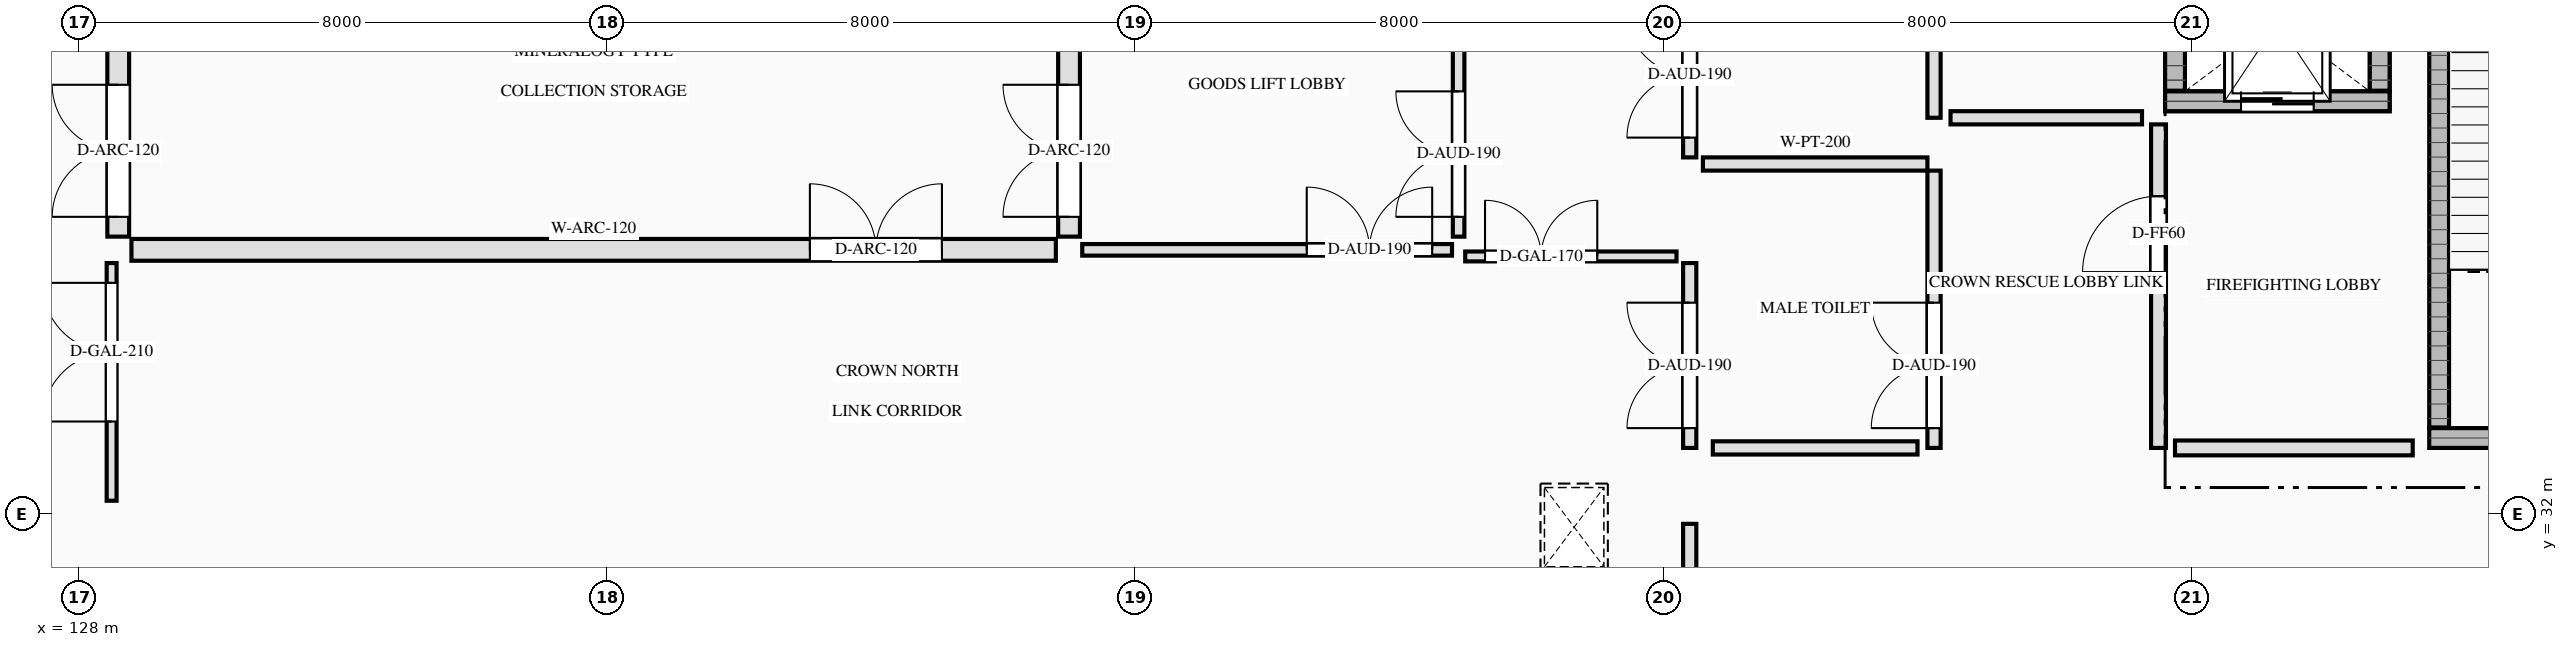
"""IFC4 building model, lengths in metres.
Left out: names, types, materials, properties, quantities, classifications, styles, units other than length and angle.
Written with IfcOpenShell. Run it as: python <this file> out.ifc"""

import sys

from ifc_helpers import new_model, si_unit, direction, frame, frame_2d, origin, place, context, subcontext, project, spatial, rectangle, extrude, element, fill, save


model = new_model("IFC4")
c1 = context("Model", 3, precision=1e-05, world=origin(), true_north=direction((0.0, 1.0)))
c2 = subcontext(c1, "Body", "Model", "MODEL_VIEW")
j1 = project(units=[si_unit("LENGTHUNIT", "METRE"), si_unit("PLANEANGLEUNIT", "RADIAN")], contexts=[c1])
p1 = place(None, origin())
s1 = spatial("IfcSite", under=j1, at=p1, CompositionType="ELEMENT")
p2 = place(p1, origin())
s2 = spatial("IfcBuilding", under=s1, at=p2, CompositionType="ELEMENT")
p3 = place(p2, frame((0.0, 0.0, 26.0)))
s3 = spatial("IfcBuildingStorey", under=s2, at=p3, CompositionType="ELEMENT", Elevation=26.0)
p4 = place(p3, frame((163.6, 33.15, 0.0), z_axis=(0.0, 0.0, 1.0), x_axis=(1.0, 0.0, 0.0)))
e1 = element("IfcWall", 1, at=p4, inside=s3, PredefinedType="SHEAR", context=c2, shape_type="SweptSolid", body=[
    extrude(rectangle(XDim=4.4, YDim=0.3, at=frame_2d((2.2, 0.0))), origin(), (0.0, 0.0, 1.0), 8.0),
])
p5 = place(p4, frame((1.3, 0.0, 0.0)))
e2 = element("IfcOpeningElement", 2, at=p5, cuts=e1, PredefinedType="OPENING", context=c2, shape_type="SweptSolid", body=[
    extrude(rectangle(XDim=1.8, YDim=2.2, at=frame_2d((0.9, 1.1))), frame((0.0, 0.16, 0.0), z_axis=(0.0, -1.0, 0.0), x_axis=(1.0, 0.0, 0.0)), (0.0, 0.0, 1.0), 0.32),
])
p6 = place(p3, frame((163.75, 33.31, 0.0), z_axis=(0.0, 0.0, 1.0), x_axis=(0.0, 1.0, 0.0)))
e3 = element("IfcWall", 3, at=p6, inside=s3, PredefinedType="SHEAR", context=c2, shape_type="SweptSolid", body=[
    extrude(rectangle(XDim=9.38, YDim=0.3, at=frame_2d((4.69, 0.0))), origin(), (0.0, 0.0, 1.0), 8.0),
])
p7 = place(p3, frame((159.6, 38.25, 0.0), z_axis=(0.0, 0.0, 1.0), x_axis=(1.0, 0.0, 0.0)))
e4 = element("IfcWall", 4, at=p7, inside=s3, PredefinedType="SHEAR", context=c2, shape_type="SweptSolid", body=[
    extrude(rectangle(XDim=3.4, YDim=0.3, at=frame_2d((1.7, 0.0))), origin(), (0.0, 0.0, 1.0), 8.0),
])
p8 = place(p7, frame((1.15, 0.0, 0.0)))
e5 = element("IfcOpeningElement", 5, at=p8, cuts=e4, PredefinedType="OPENING", context=c2, shape_type="SweptSolid", body=[
    extrude(rectangle(XDim=1.1, YDim=2.15, at=frame_2d((0.55, 1.075))), frame((0.0, 0.16, 0.0), z_axis=(0.0, -1.0, 0.0), x_axis=(1.0, 0.0, 0.0)), (0.0, 0.0, 1.0), 0.32),
])
for number, where, z_axis, x_axis in (
    (6, (159.75, 38.41, 0.0), (0.0, 0.0, 1.0), (0.0, 1.0, 0.0)),
    (7, (162.85, 38.41, 0.0), (0.0, 0.0, 1.0), (0.0, 1.0, 0.0)),
):
    element("IfcWall", number, at=place(p3, frame(where, z_axis=z_axis, x_axis=x_axis)), inside=s3, PredefinedType="SHEAR", context=c2, shape_type="SweptSolid", body=[
        extrude(rectangle(XDim=2.08, YDim=0.3, at=frame_2d((1.04, 0.0))), origin(), (0.0, 0.0, 1.0), 8.0),
    ])
p9 = place(p3, frame((159.6, 38.25, 8.0), z_axis=(0.0, 0.0, 1.0), x_axis=(1.0, 0.0, 0.0)))
e8 = element("IfcWall", 8, at=p9, inside=s3, PredefinedType="SHEAR", context=c2, shape_type="SweptSolid", body=[
    extrude(rectangle(XDim=3.4, YDim=0.3, at=frame_2d((1.7, 0.0))), origin(), (0.0, 0.0, 1.0), 1.3),
])
for number, where, z_axis, x_axis in (
    (9, (159.75, 38.41, 8.0), (0.0, 0.0, 1.0), (0.0, 1.0, 0.0)),
    (10, (162.85, 38.41, 8.0), (0.0, 0.0, 1.0), (0.0, 1.0, 0.0)),
):
    element("IfcWall", number, at=place(p3, frame(where, z_axis=z_axis, x_axis=x_axis)), inside=s3, PredefinedType="SHEAR", context=c2, shape_type="SweptSolid", body=[
        extrude(rectangle(XDim=2.08, YDim=0.3, at=frame_2d((1.04, 0.0))), origin(), (0.0, 0.0, 1.0), 1.3),
    ])
p10 = place(p3, frame((159.5, 33.0, 0.0), z_axis=(0.0, 0.0, 1.0), x_axis=(0.0, 1.0, 0.0)))
e11 = element("IfcWall", 11, at=p10, inside=s3, PredefinedType="SOLIDWALL", context=c2, shape_type="SweptSolid", body=[
    extrude(rectangle(XDim=4.9, YDim=0.225, at=frame_2d((2.45, 0.0))), origin(), (0.0, 0.0, 1.0), 7.82),
])
p11 = place(p10, frame((2.663, 0.0, 0.0)))
e12 = element("IfcOpeningElement", 12, at=p11, cuts=e11, PredefinedType="OPENING", context=c2, shape_type="SweptSolid", body=[
    extrude(rectangle(XDim=1.15, YDim=2.2, at=frame_2d((0.575, 1.1))), frame((0.0, 0.123, 0.0), z_axis=(0.0, -1.0, 0.0), x_axis=(1.0, 0.0, 0.0)), (0.0, 0.0, 1.0), 0.245),
])
p12 = place(p3, frame((143.2, 36.0, 0.0), z_axis=(0.0, 0.0, 1.0), x_axis=(1.0, 0.0, 0.0)))
e13 = element("IfcWall", 13, at=p12, inside=s3, PredefinedType="PARTITIONING", context=c2, shape_type="SweptSolid", body=[
    extrude(rectangle(XDim=5.6, YDim=0.175, at=frame_2d((2.8, 0.0))), origin(), (0.0, 0.0, 1.0), 7.82),
])
p13 = place(p12, frame((3.4, 0.0, 0.0)))
e14 = element("IfcOpeningElement", 14, at=p13, cuts=e13, PredefinedType="OPENING", context=c2, shape_type="SweptSolid", body=[
    extrude(rectangle(XDim=1.9, YDim=2.35, at=frame_2d((0.95, 1.175))), frame((0.0, 0.097, 0.0), z_axis=(0.0, -1.0, 0.0), x_axis=(1.0, 0.0, 0.0)), (0.0, 0.0, 1.0), 0.195),
])
p14 = place(p3, frame((148.9, 36.2, 0.0), z_axis=(0.0, 0.0, 1.0), x_axis=(0.0, 1.0, 0.0)))
e15 = element("IfcWall", 15, at=p14, inside=s3, PredefinedType="PARTITIONING", context=c2, shape_type="SweptSolid", body=[
    extrude(rectangle(XDim=4.6, YDim=0.175, at=frame_2d((2.3, 0.0))), origin(), (0.0, 0.0, 1.0), 7.82),
])
p15 = place(p14, frame((0.3, 0.0, 0.0)))
e16 = element("IfcOpeningElement", 16, at=p15, cuts=e15, PredefinedType="OPENING", context=c2, shape_type="SweptSolid", body=[
    extrude(rectangle(XDim=1.9, YDim=2.35, at=frame_2d((0.95, 1.175))), frame((0.0, 0.097, 0.0), z_axis=(0.0, -1.0, 0.0), x_axis=(1.0, 0.0, 0.0)), (0.0, 0.0, 1.0), 0.195),
])
p16 = place(p3, frame((143.0, 36.2, 0.0), z_axis=(0.0, 0.0, 1.0), x_axis=(0.0, 1.0, 0.0)))
e17 = element("IfcWall", 17, at=p16, inside=s3, PredefinedType="SOLIDWALL", context=c2, shape_type="SweptSolid", body=[
    extrude(rectangle(XDim=4.6, YDim=0.33, at=frame_2d((2.3, 0.0))), origin(), (0.0, 0.0, 1.0), 7.82),
])
p17 = place(p16, frame((0.3, 0.0, 0.0)))
e18 = element("IfcOpeningElement", 18, at=p17, cuts=e17, PredefinedType="OPENING", context=c2, shape_type="SweptSolid", body=[
    extrude(rectangle(XDim=2.0, YDim=2.5, at=frame_2d((1.0, 1.25))), frame((0.0, 0.175, 0.0), z_axis=(0.0, -1.0, 0.0), x_axis=(1.0, 0.0, 0.0)), (0.0, 0.0, 1.0), 0.35),
])
p18 = place(p3, frame((152.6, 37.3, 0.0), z_axis=(0.0, 0.0, 1.0), x_axis=(1.0, 0.0, 0.0)))
e19 = element("IfcWall", 19, at=p18, inside=s3, PredefinedType="PARTITIONING", context=c2, shape_type="SweptSolid", body=[
    extrude(rectangle(XDim=3.4, YDim=0.2, at=frame_2d((1.7, 0.0))), origin(), (0.0, 0.0, 1.0), 7.82),
])
p19 = place(p3, frame((152.4, 33.0, 0.0), z_axis=(0.0, 0.0, 1.0), x_axis=(0.0, 1.0, 0.0)))
e20 = element("IfcWall", 20, at=p19, inside=s3, PredefinedType="PARTITIONING", context=c2, shape_type="SweptSolid", body=[
    extrude(rectangle(XDim=2.8, YDim=0.2, at=frame_2d((1.4, 0.0))), origin(), (0.0, 0.0, 1.0), 7.82),
])
p20 = place(p19, frame((0.3, 0.0, 0.0)))
e21 = element("IfcOpeningElement", 21, at=p20, cuts=e20, PredefinedType="OPENING", context=c2, shape_type="SweptSolid", body=[
    extrude(rectangle(XDim=1.9, YDim=2.35, at=frame_2d((0.95, 1.175))), frame((0.0, 0.11, 0.0), z_axis=(0.0, -1.0, 0.0), x_axis=(1.0, 0.0, 0.0)), (0.0, 0.0, 1.0), 0.22),
])
p21 = place(p3, frame((156.1, 33.0, 0.0), z_axis=(0.0, 0.0, 1.0), x_axis=(0.0, 1.0, 0.0)))
e22 = element("IfcWall", 22, at=p21, inside=s3, PredefinedType="PARTITIONING", context=c2, shape_type="SweptSolid", body=[
    extrude(rectangle(XDim=4.2, YDim=0.2, at=frame_2d((2.1, 0.0))), origin(), (0.0, 0.0, 1.0), 7.82),
])
p22 = place(p21, frame((0.3, 0.0, 0.0)))
e23 = element("IfcOpeningElement", 23, at=p22, cuts=e22, PredefinedType="OPENING", context=c2, shape_type="SweptSolid", body=[
    extrude(rectangle(XDim=1.9, YDim=2.35, at=frame_2d((0.95, 1.175))), frame((0.0, 0.11, 0.0), z_axis=(0.0, -1.0, 0.0), x_axis=(1.0, 0.0, 0.0)), (0.0, 0.0, 1.0), 0.22),
])
p23 = place(p3, frame((156.1, 38.0, 0.0), z_axis=(0.0, 0.0, 1.0), x_axis=(0.0, 1.0, 0.0)))
e24 = element("IfcWall", 24, at=p23, inside=s3, PredefinedType="PARTITIONING", context=c2, shape_type="SweptSolid", body=[
    extrude(rectangle(XDim=3.6, YDim=0.2, at=frame_2d((1.8, 0.0))), origin(), (0.0, 0.0, 1.0), 7.82),
])
p24 = place(p3, frame((152.4, 37.4, 0.0), z_axis=(0.0, 0.0, 1.0), x_axis=(0.0, 1.0, 0.0)))
e25 = element("IfcWall", 25, at=p24, inside=s3, PredefinedType="PARTITIONING", context=c2, shape_type="SweptSolid", body=[
    extrude(rectangle(XDim=4.2, YDim=0.2, at=frame_2d((2.1, 0.0))), origin(), (0.0, 0.0, 1.0), 7.82),
])
p25 = place(p24, frame((0.3, 0.0, 0.0)))
e26 = element("IfcOpeningElement", 26, at=p25, cuts=e25, PredefinedType="OPENING", context=c2, shape_type="SweptSolid", body=[
    extrude(rectangle(XDim=1.9, YDim=2.35, at=frame_2d((0.95, 1.175))), frame((0.0, 0.11, 0.0), z_axis=(0.0, -1.0, 0.0), x_axis=(1.0, 0.0, 0.0)), (0.0, 0.0, 1.0), 0.22),
])
p26 = place(p3, frame((128.5, 32.2, 0.0), z_axis=(0.0, 0.0, 1.0), x_axis=(0.0, 1.0, 0.0)))
e27 = element("IfcWall", 27, at=p26, inside=s3, PredefinedType="PARTITIONING", context=c2, shape_type="SweptSolid", body=[
    extrude(rectangle(XDim=3.6, YDim=0.15, at=frame_2d((1.8, 0.0))), origin(), (0.0, 0.0, 1.0), 7.82),
])
p27 = place(p26, frame((1.2, 0.0, 0.0)))
e28 = element("IfcOpeningElement", 28, at=p27, cuts=e27, PredefinedType="OPENING", context=c2, shape_type="SweptSolid", body=[
    extrude(rectangle(XDim=2.1, YDim=2.6, at=frame_2d((1.05, 1.3))), frame((0.0, 0.085, 0.0), z_axis=(0.0, -1.0, 0.0), x_axis=(1.0, 0.0, 0.0)), (0.0, 0.0, 1.0), 0.17),
])
p28 = place(p3, frame((128.6, 36.2, 0.0), z_axis=(0.0, 0.0, 1.0), x_axis=(0.0, 1.0, 0.0)))
e29 = element("IfcWall", 29, at=p28, inside=s3, PredefinedType="SOLIDWALL", context=c2, shape_type="SweptSolid", body=[
    extrude(rectangle(XDim=8.6, YDim=0.33, at=frame_2d((4.3, 0.0))), origin(), (0.0, 0.0, 1.0), 7.82),
])
p29 = place(p28, frame((0.3, 0.0, 0.0)))
e30 = element("IfcOpeningElement", 30, at=p29, cuts=e29, PredefinedType="OPENING", context=c2, shape_type="SweptSolid", body=[
    extrude(rectangle(XDim=2.0, YDim=2.5, at=frame_2d((1.0, 1.25))), frame((0.0, 0.175, 0.0), z_axis=(0.0, -1.0, 0.0), x_axis=(1.0, 0.0, 0.0)), (0.0, 0.0, 1.0), 0.35),
])
p30 = place(p3, frame((149.0, 35.9, 0.0), z_axis=(0.0, 0.0, 1.0), x_axis=(1.0, 0.0, 0.0)))
e31 = element("IfcWall", 31, at=p30, inside=s3, PredefinedType="PARTITIONING", context=c2, shape_type="SweptSolid", body=[
    extrude(rectangle(XDim=3.2, YDim=0.15, at=frame_2d((1.6, 0.0))), origin(), (0.0, 0.0, 1.0), 7.82),
])
p31 = place(p30, frame((0.3, 0.0, 0.0)))
e32 = element("IfcOpeningElement", 32, at=p31, cuts=e31, PredefinedType="OPENING", context=c2, shape_type="SweptSolid", body=[
    extrude(rectangle(XDim=1.7, YDim=2.45, at=frame_2d((0.85, 1.225))), frame((0.0, 0.085, 0.0), z_axis=(0.0, -1.0, 0.0), x_axis=(1.0, 0.0, 0.0)), (0.0, 0.0, 1.0), 0.17),
])
p32 = place(p3, frame((128.8, 36.0, 0.0), z_axis=(0.0, 0.0, 1.0), x_axis=(1.0, 0.0, 0.0)))
e33 = element("IfcWall", 33, at=p32, inside=s3, PredefinedType="SOLIDWALL", context=c2, shape_type="SweptSolid", body=[
    extrude(rectangle(XDim=14.0, YDim=0.33, at=frame_2d((7.0, 0.0))), origin(), (0.0, 0.0, 1.0), 7.82),
])
p33 = place(p32, frame((10.275, 0.0, 0.0)))
e34 = element("IfcOpeningElement", 34, at=p33, cuts=e33, PredefinedType="OPENING", context=c2, shape_type="SweptSolid", body=[
    extrude(rectangle(XDim=2.0, YDim=2.5, at=frame_2d((1.0, 1.25))), frame((0.0, 0.175, 0.0), z_axis=(0.0, -1.0, 0.0), x_axis=(1.0, 0.0, 0.0)), (0.0, 0.0, 1.0), 0.35),
])
p34 = place(p3, frame((159.75, 33.0, 0.0), z_axis=(0.0, 0.0, 1.0), x_axis=(1.0, 0.0, 0.0)))
e35 = element("IfcWall", 35, at=p34, inside=s3, PredefinedType="SOLIDWALL", context=c2, shape_type="SweptSolid", body=[
    extrude(rectangle(XDim=3.6, YDim=0.225, at=frame_2d((1.8, 0.0))), origin(), (0.0, 0.0, 1.0), 7.82),
])
p35 = place(p3, frame((152.75, 33.0, 0.0), z_axis=(0.0, 0.0, 1.0), x_axis=(1.0, 0.0, 0.0)))
e36 = element("IfcWall", 36, at=p35, inside=s3, PredefinedType="PARTITIONING", context=c2, shape_type="SweptSolid", body=[
    extrude(rectangle(XDim=3.1, YDim=0.2, at=frame_2d((1.55, 0.0))), origin(), (0.0, 0.0, 1.0), 7.82),
])
p36 = place(p3, frame((156.35, 38.0, 0.0), z_axis=(0.0, 0.0, 1.0), x_axis=(1.0, 0.0, 0.0)))
e37 = element("IfcWall", 37, at=p36, inside=s3, PredefinedType="PARTITIONING", context=c2, shape_type="SweptSolid", body=[
    extrude(rectangle(XDim=2.9, YDim=0.2, at=frame_2d((1.45, 0.0))), origin(), (0.0, 0.0, 1.0), 7.82),
])
p37 = place(p3, frame((152.4, 17.55, 0.0), z_axis=(0.0, 0.0, 1.0), x_axis=(0.0, 1.0, 0.0)))
e38 = element("IfcWall", 38, at=p37, inside=s3, PredefinedType="PARTITIONING", context=c2, shape_type="SweptSolid", body=[
    extrude(rectangle(XDim=14.3, YDim=0.2, at=frame_2d((7.15, 0.0))), origin(), (0.0, 0.0, 1.0), 7.82),
])
p38 = place(p37, frame((2.057, 0.0, 0.0)))
e39 = element("IfcOpeningElement", 39, at=p38, cuts=e38, PredefinedType="OPENING", context=c2, shape_type="SweptSolid", body=[
    extrude(rectangle(XDim=1.05, YDim=2.25, at=frame_2d((0.525, 1.125))), frame((0.0, 0.11, 0.0), z_axis=(0.0, -1.0, 0.0), x_axis=(1.0, 0.0, 0.0)), (0.0, 0.0, 1.0), 0.22),
])
p39 = place(p8, origin())
e40 = element("IfcDoor", 40, at=p39, inside=s3, OperationType="SLIDING_TO_LEFT", PredefinedType="DOOR", context=c2, shape_type="SweptSolid", body=[
    extrude(rectangle(XDim=1.1, YDim=2.15, at=frame_2d((0.55, 1.075))), frame((0.0, 0.025, 0.0), z_axis=(0.0, -1.0, 0.0), x_axis=(1.0, 0.0, 0.0)), (0.0, 0.0, 1.0), 0.05),
])
fill(e5, e40)
p40 = place(p11, origin())
e41 = element("IfcDoor", 41, at=p40, inside=s3, OperationType="SINGLE_SWING_LEFT", PredefinedType="DOOR", context=c2, shape_type="SweptSolid", body=[
    extrude(rectangle(XDim=1.15, YDim=2.2, at=frame_2d((0.575, 1.1))), frame((0.0, 0.025, 0.0), z_axis=(0.0, -1.0, 0.0), x_axis=(1.0, 0.0, 0.0)), (0.0, 0.0, 1.0), 0.05),
])
fill(e12, e41)
p41 = place(p13, origin())
e42 = element("IfcDoor", 42, at=p41, inside=s3, OperationType="DOUBLE_DOOR_SINGLE_SWING", PredefinedType="DOOR", context=c2, shape_type="SweptSolid", body=[
    extrude(rectangle(XDim=1.9, YDim=2.35, at=frame_2d((0.95, 1.175))), frame((0.0, 0.025, 0.0), z_axis=(0.0, -1.0, 0.0), x_axis=(1.0, 0.0, 0.0)), (0.0, 0.0, 1.0), 0.05),
])
fill(e14, e42)
p42 = place(p15, origin())
e43 = element("IfcDoor", 43, at=p42, inside=s3, OperationType="DOUBLE_DOOR_SINGLE_SWING", PredefinedType="DOOR", context=c2, shape_type="SweptSolid", body=[
    extrude(rectangle(XDim=1.9, YDim=2.35, at=frame_2d((0.95, 1.175))), frame((0.0, 0.025, 0.0), z_axis=(0.0, -1.0, 0.0), x_axis=(1.0, 0.0, 0.0)), (0.0, 0.0, 1.0), 0.05),
])
fill(e16, e43)
p43 = place(p17, origin())
e44 = element("IfcDoor", 44, at=p43, inside=s3, OperationType="DOUBLE_DOOR_SINGLE_SWING", PredefinedType="DOOR", context=c2, shape_type="SweptSolid", body=[
    extrude(rectangle(XDim=2.0, YDim=2.5, at=frame_2d((1.0, 1.25))), frame((0.0, 0.025, 0.0), z_axis=(0.0, -1.0, 0.0), x_axis=(1.0, 0.0, 0.0)), (0.0, 0.0, 1.0), 0.05),
])
fill(e18, e44)
p44 = place(p20, origin())
e45 = element("IfcDoor", 45, at=p44, inside=s3, OperationType="DOUBLE_DOOR_SINGLE_SWING", PredefinedType="DOOR", context=c2, shape_type="SweptSolid", body=[
    extrude(rectangle(XDim=1.9, YDim=2.35, at=frame_2d((0.95, 1.175))), frame((0.0, 0.025, 0.0), z_axis=(0.0, -1.0, 0.0), x_axis=(1.0, 0.0, 0.0)), (0.0, 0.0, 1.0), 0.05),
])
fill(e21, e45)
p45 = place(p22, origin())
e46 = element("IfcDoor", 46, at=p45, inside=s3, OperationType="DOUBLE_DOOR_SINGLE_SWING", PredefinedType="DOOR", context=c2, shape_type="SweptSolid", body=[
    extrude(rectangle(XDim=1.9, YDim=2.35, at=frame_2d((0.95, 1.175))), frame((0.0, 0.025, 0.0), z_axis=(0.0, -1.0, 0.0), x_axis=(1.0, 0.0, 0.0)), (0.0, 0.0, 1.0), 0.05),
])
fill(e23, e46)
p46 = place(p25, origin())
e47 = element("IfcDoor", 47, at=p46, inside=s3, OperationType="DOUBLE_DOOR_SINGLE_SWING", PredefinedType="DOOR", context=c2, shape_type="SweptSolid", body=[
    extrude(rectangle(XDim=1.9, YDim=2.35, at=frame_2d((0.95, 1.175))), frame((0.0, 0.025, 0.0), z_axis=(0.0, -1.0, 0.0), x_axis=(1.0, 0.0, 0.0)), (0.0, 0.0, 1.0), 0.05),
])
fill(e26, e47)
p47 = place(p27, origin())
e48 = element("IfcDoor", 48, at=p47, inside=s3, OperationType="DOUBLE_DOOR_SINGLE_SWING", PredefinedType="DOOR", context=c2, shape_type="SweptSolid", body=[
    extrude(rectangle(XDim=2.1, YDim=2.6, at=frame_2d((1.05, 1.3))), frame((0.0, 0.025, 0.0), z_axis=(0.0, -1.0, 0.0), x_axis=(1.0, 0.0, 0.0)), (0.0, 0.0, 1.0), 0.05),
])
fill(e28, e48)
p48 = place(p29, origin())
e49 = element("IfcDoor", 49, at=p48, inside=s3, OperationType="DOUBLE_DOOR_SINGLE_SWING", PredefinedType="DOOR", context=c2, shape_type="SweptSolid", body=[
    extrude(rectangle(XDim=2.0, YDim=2.5, at=frame_2d((1.0, 1.25))), frame((0.0, 0.025, 0.0), z_axis=(0.0, -1.0, 0.0), x_axis=(1.0, 0.0, 0.0)), (0.0, 0.0, 1.0), 0.05),
])
fill(e30, e49)
p49 = place(p31, origin())
e50 = element("IfcDoor", 50, at=p49, inside=s3, OperationType="DOUBLE_DOOR_SINGLE_SWING", PredefinedType="DOOR", context=c2, shape_type="SweptSolid", body=[
    extrude(rectangle(XDim=1.7, YDim=2.45, at=frame_2d((0.85, 1.225))), frame((0.0, 0.025, 0.0), z_axis=(0.0, -1.0, 0.0), x_axis=(1.0, 0.0, 0.0)), (0.0, 0.0, 1.0), 0.05),
])
fill(e32, e50)
p50 = place(p33, origin())
e51 = element("IfcDoor", 51, at=p50, inside=s3, OperationType="DOUBLE_DOOR_SINGLE_SWING", PredefinedType="DOOR", context=c2, shape_type="SweptSolid", body=[
    extrude(rectangle(XDim=2.0, YDim=2.5, at=frame_2d((1.0, 1.25))), frame((0.0, 0.025, 0.0), z_axis=(0.0, -1.0, 0.0), x_axis=(1.0, 0.0, 0.0)), (0.0, 0.0, 1.0), 0.05),
])
fill(e34, e51)
save(model, sys.argv[1])
